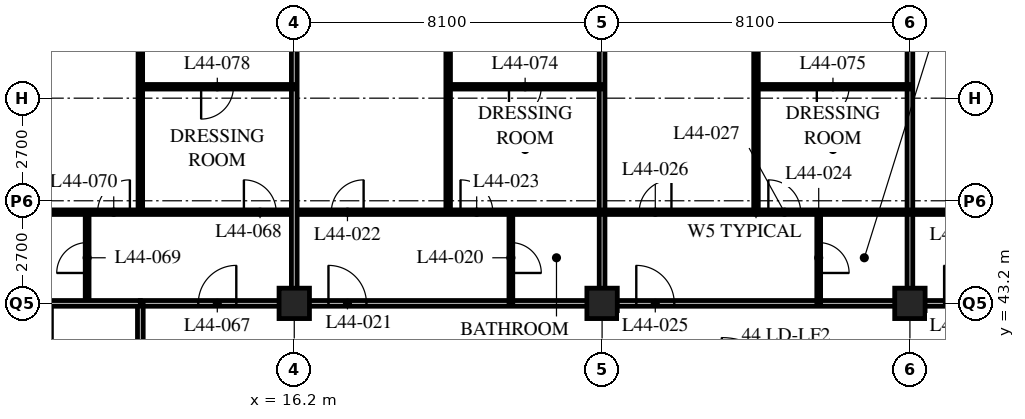
"""IFC4 building model, lengths in metres.
Left out: names, types, materials, properties, quantities, classifications, styles, units other than length and angle.
Written with IfcOpenShell. Run it as: python <this file> out.ifc"""

import sys

from ifc_helpers import new_model, si_unit, direction, frame, frame_2d, origin, origin_2d, place, context, subcontext, project, spatial, rectangle, hollow_rectangle, extrude, element, fill, save


model = new_model("IFC4")
c1 = context("Model", 3, precision=1e-05, world=origin(), true_north=direction((0.0, 1.0)))
c2 = subcontext(c1, "Body", "Model", "MODEL_VIEW")
j1 = project(units=[si_unit("LENGTHUNIT", "METRE"), si_unit("PLANEANGLEUNIT", "RADIAN")], contexts=[c1])
p1 = place(None, origin())
s1 = spatial("IfcSite", under=j1, at=p1, CompositionType="ELEMENT")
p2 = place(p1, origin())
s2 = spatial("IfcBuilding", under=s1, at=p2, CompositionType="ELEMENT")
p3 = place(p2, frame((0.0, 0.0, 174.0)))
s3 = spatial("IfcBuildingStorey", under=s2, at=p3, CompositionType="ELEMENT", Elevation=174.0)
for number, where, z_axis, x_axis in (
    (1, (16.2, 43.2, 0.0), (0.0, 0.0, 1.0), (1.0, 0.0, 0.0)),
    (2, (24.3, 43.2, 0.0), (0.0, 0.0, 1.0), (1.0, 0.0, 0.0)),
    (3, (32.4, 43.2, 0.0), (0.0, 0.0, 1.0), (1.0, 0.0, 0.0)),
):
    element("IfcColumn", number, at=place(p3, frame(where, z_axis=z_axis, x_axis=x_axis)), inside=s3, PredefinedType="COLUMN", context=c2, shape_type="SweptSolid", body=[
        extrude(hollow_rectangle(XDim=0.8, YDim=0.8, WallThickness=0.08, at=origin_2d()), origin(), (0.0, 0.0, 1.0), 3.6),
    ])
p4 = place(p3, frame((12.15, 43.2, 0.0), z_axis=(0.0, 0.0, 1.0), x_axis=(1.0, 0.0, 0.0)))
e4 = element("IfcWall", 4, at=p4, inside=s3, PredefinedType="PARTITIONING", context=c2, shape_type="SweptSolid", body=[
    extrude(rectangle(XDim=32.4, YDim=0.15, at=frame_2d((16.2, 0.0))), origin(), (0.0, 0.0, 1.0), 2.778),
])
p5 = place(p4, frame((4.95, 0.0, 0.0)))
e5 = element("IfcOpeningElement", 5, at=p5, cuts=e4, PredefinedType="OPENING", context=c2, shape_type="SweptSolid", body=[
    extrude(rectangle(XDim=1.0, YDim=2.1, at=frame_2d((0.5, 1.05))), frame((0.0, 0.085, 0.0), z_axis=(0.0, -1.0, 0.0), x_axis=(1.0, 0.0, 0.0)), (0.0, 0.0, 1.0), 0.17),
])
p6 = place(p4, frame((13.05, 0.0, 0.0)))
e6 = element("IfcOpeningElement", 6, at=p6, cuts=e4, PredefinedType="OPENING", context=c2, shape_type="SweptSolid", body=[
    extrude(rectangle(XDim=1.0, YDim=2.1, at=frame_2d((0.5, 1.05))), frame((0.0, 0.085, 0.0), z_axis=(0.0, -1.0, 0.0), x_axis=(1.0, 0.0, 0.0)), (0.0, 0.0, 1.0), 0.17),
])
p7 = place(p4, frame((21.15, 0.0, 0.0)))
e7 = element("IfcOpeningElement", 7, at=p7, cuts=e4, PredefinedType="OPENING", context=c2, shape_type="SweptSolid", body=[
    extrude(rectangle(XDim=1.0, YDim=2.1, at=frame_2d((0.5, 1.05))), frame((0.0, 0.085, 0.0), z_axis=(0.0, -1.0, 0.0), x_axis=(1.0, 0.0, 0.0)), (0.0, 0.0, 1.0), 0.17),
])
p8 = place(p4, frame((29.875, 0.0, 0.0)))
e8 = element("IfcOpeningElement", 8, at=p8, cuts=e4, PredefinedType="OPENING", context=c2, shape_type="SweptSolid", body=[
    extrude(rectangle(XDim=1.0, YDim=2.1, at=frame_2d((0.5, 1.05))), frame((0.0, 0.085, 0.0), z_axis=(0.0, -1.0, 0.0), x_axis=(1.0, 0.0, 0.0)), (0.0, 0.0, 1.0), 0.17),
])
p9 = place(p4, frame((1.525, 0.0, 0.0)))
e9 = element("IfcOpeningElement", 9, at=p9, cuts=e4, PredefinedType="OPENING", context=c2, shape_type="SweptSolid", body=[
    extrude(rectangle(XDim=1.0, YDim=2.1, at=frame_2d((0.5, 1.05))), frame((0.0, 0.085, 0.0), z_axis=(0.0, -1.0, 0.0), x_axis=(1.0, 0.0, 0.0)), (0.0, 0.0, 1.0), 0.17),
])
p10 = place(p3, frame((12.15, 18.9, 0.0), z_axis=(0.0, 0.0, 1.0), x_axis=(0.0, 1.0, 0.0)))
e10 = element("IfcWall", 10, at=p10, inside=s3, PredefinedType="PARTITIONING", context=c2, shape_type="SweptSolid", body=[
    extrude(rectangle(XDim=24.3, YDim=0.15, at=frame_2d((12.15, 0.0))), origin(), (0.0, 0.0, 1.0), 3.39),
])
p11 = place(p10, frame((2.35, 0.0, 0.0)))
e11 = element("IfcOpeningElement", 11, at=p11, cuts=e10, PredefinedType="OPENING", context=c2, shape_type="SweptSolid", body=[
    extrude(rectangle(XDim=1.0, YDim=2.1, at=frame_2d((0.5, 1.05))), frame((0.0, 0.085, 0.0), z_axis=(0.0, -1.0, 0.0), x_axis=(1.0, 0.0, 0.0)), (0.0, 0.0, 1.0), 0.17),
])
p12 = place(p10, frame((6.4, 0.0, 0.0)))
e12 = element("IfcOpeningElement", 12, at=p12, cuts=e10, PredefinedType="OPENING", context=c2, shape_type="SweptSolid", body=[
    extrude(rectangle(XDim=1.0, YDim=2.1, at=frame_2d((0.5, 1.05))), frame((0.0, 0.085, 0.0), z_axis=(0.0, -1.0, 0.0), x_axis=(1.0, 0.0, 0.0)), (0.0, 0.0, 1.0), 0.17),
])
p13 = place(p10, frame((8.5, 0.0, 0.0)))
e13 = element("IfcOpeningElement", 13, at=p13, cuts=e10, PredefinedType="OPENING", context=c2, shape_type="SweptSolid", body=[
    extrude(rectangle(XDim=1.0, YDim=2.1, at=frame_2d((0.5, 1.05))), frame((0.0, 0.085, 0.0), z_axis=(0.0, -1.0, 0.0), x_axis=(1.0, 0.0, 0.0)), (0.0, 0.0, 1.0), 0.17),
])
p14 = place(p10, frame((16.6, 0.0, 0.0)))
e14 = element("IfcOpeningElement", 14, at=p14, cuts=e10, PredefinedType="OPENING", context=c2, shape_type="SweptSolid", body=[
    extrude(rectangle(XDim=1.0, YDim=2.1, at=frame_2d((0.5, 1.05))), frame((0.0, 0.085, 0.0), z_axis=(0.0, -1.0, 0.0), x_axis=(1.0, 0.0, 0.0)), (0.0, 0.0, 1.0), 0.17),
])
p15 = place(p3, frame((21.9, 43.2, 0.0), z_axis=(0.0, 0.0, 1.0), x_axis=(0.0, 1.0, 0.0)))
e15 = element("IfcWall", 15, at=p15, inside=s3, PredefinedType="PARTITIONING", context=c2, shape_type="SweptSolid", body=[
    extrude(rectangle(XDim=2.4, YDim=0.1, at=frame_2d((1.2, 0.0))), origin(), (0.0, 0.0, 1.0), 3.39),
])
p16 = place(p15, frame((0.8, 0.0, 0.0)))
e16 = element("IfcOpeningElement", 16, at=p16, cuts=e15, PredefinedType="OPENING", context=c2, shape_type="SweptSolid", body=[
    extrude(rectangle(XDim=0.8, YDim=2.1, at=frame_2d((0.4, 1.05))), frame((0.0, 0.06, 0.0), z_axis=(0.0, -1.0, 0.0), x_axis=(1.0, 0.0, 0.0)), (0.0, 0.0, 1.0), 0.12),
])
p17 = place(p3, frame((20.25, 45.6, 0.0), z_axis=(0.0, 0.0, 1.0), x_axis=(0.0, 1.0, 0.0)))
e17 = element("IfcWall", 17, at=p17, inside=s3, PredefinedType="PARTITIONING", context=c2, shape_type="SweptSolid", body=[
    extrude(rectangle(XDim=13.5, YDim=0.12, at=frame_2d((6.75, 0.0))), origin(), (0.0, 0.0, 1.0), 3.39),
])
p18 = place(p3, frame((24.3, 43.2, 0.0), z_axis=(0.0, 0.0, 1.0), x_axis=(0.0, 1.0, 0.0)))
e18 = element("IfcWall", 18, at=p18, inside=s3, PredefinedType="PARTITIONING", context=c2, shape_type="SweptSolid", body=[
    extrude(rectangle(XDim=15.9, YDim=0.15, at=frame_2d((7.95, 0.0))), origin(), (0.0, 0.0, 1.0), 2.778),
])
p19 = place(p3, frame((30.0, 43.2, 0.0), z_axis=(0.0, 0.0, 1.0), x_axis=(0.0, 1.0, 0.0)))
e19 = element("IfcWall", 19, at=p19, inside=s3, PredefinedType="PARTITIONING", context=c2, shape_type="SweptSolid", body=[
    extrude(rectangle(XDim=2.4, YDim=0.1, at=frame_2d((1.2, 0.0))), origin(), (0.0, 0.0, 1.0), 3.39),
])
p20 = place(p19, frame((0.8, 0.0, 0.0)))
e20 = element("IfcOpeningElement", 20, at=p20, cuts=e19, PredefinedType="OPENING", context=c2, shape_type="SweptSolid", body=[
    extrude(rectangle(XDim=0.8, YDim=2.1, at=frame_2d((0.4, 1.05))), frame((0.0, 0.06, 0.0), z_axis=(0.0, -1.0, 0.0), x_axis=(1.0, 0.0, 0.0)), (0.0, 0.0, 1.0), 0.12),
])
p21 = place(p3, frame((28.35, 45.6, 0.0), z_axis=(0.0, 0.0, 1.0), x_axis=(0.0, 1.0, 0.0)))
e21 = element("IfcWall", 21, at=p21, inside=s3, PredefinedType="PARTITIONING", context=c2, shape_type="SweptSolid", body=[
    extrude(rectangle(XDim=13.5, YDim=0.12, at=frame_2d((6.75, 0.0))), origin(), (0.0, 0.0, 1.0), 3.39),
])
p22 = place(p3, frame((32.4, 43.2, 0.0), z_axis=(0.0, 0.0, 1.0), x_axis=(0.0, 1.0, 0.0)))
e22 = element("IfcWall", 22, at=p22, inside=s3, PredefinedType="PARTITIONING", context=c2, shape_type="SweptSolid", body=[
    extrude(rectangle(XDim=15.9, YDim=0.15, at=frame_2d((7.95, 0.0))), origin(), (0.0, 0.0, 1.0), 2.778),
])
p23 = place(p3, frame((10.75, 43.2, 0.0), z_axis=(0.0, 0.0, 1.0), x_axis=(0.0, 1.0, 0.0)))
e23 = element("IfcWall", 23, at=p23, inside=s3, PredefinedType="PARTITIONING", context=c2, shape_type="SweptSolid", body=[
    extrude(rectangle(XDim=2.4, YDim=0.1, at=frame_2d((1.2, 0.0))), origin(), (0.0, 0.0, 1.0), 3.39),
])
p24 = place(p23, frame((0.8, 0.0, 0.0)))
e24 = element("IfcOpeningElement", 24, at=p24, cuts=e23, PredefinedType="OPENING", context=c2, shape_type="SweptSolid", body=[
    extrude(rectangle(XDim=0.8, YDim=2.1, at=frame_2d((0.4, 1.05))), frame((0.0, 0.06, 0.0), z_axis=(0.0, -1.0, 0.0), x_axis=(1.0, 0.0, 0.0)), (0.0, 0.0, 1.0), 0.12),
])
p25 = place(p3, frame((8.15, 45.6, 0.0), z_axis=(0.0, 0.0, 1.0), x_axis=(1.0, 0.0, 0.0)))
e25 = element("IfcWall", 25, at=p25, inside=s3, PredefinedType="PARTITIONING", context=c2, shape_type="SweptSolid", body=[
    extrude(rectangle(XDim=40.4, YDim=0.12, at=frame_2d((20.2, 0.0))), origin(), (0.0, 0.0, 1.0), 3.39),
])
p26 = place(p25, frame((9.025, 0.0, 0.0)))
e26 = element("IfcOpeningElement", 26, at=p26, cuts=e25, PredefinedType="OPENING", context=c2, shape_type="SweptSolid", body=[
    extrude(rectangle(XDim=0.85, YDim=2.1, at=frame_2d((0.425, 1.05))), frame((0.0, 0.07, 0.0), z_axis=(0.0, -1.0, 0.0), x_axis=(1.0, 0.0, 0.0)), (0.0, 0.0, 1.0), 0.14),
])
p27 = place(p25, frame((12.425, 0.0, 0.0)))
e27 = element("IfcOpeningElement", 27, at=p27, cuts=e25, PredefinedType="OPENING", context=c2, shape_type="SweptSolid", body=[
    extrude(rectangle(XDim=0.85, YDim=2.1, at=frame_2d((0.425, 1.05))), frame((0.0, 0.07, 0.0), z_axis=(0.0, -1.0, 0.0), x_axis=(1.0, 0.0, 0.0)), (0.0, 0.0, 1.0), 0.14),
])
p28 = place(p25, frame((17.125, 0.0, 0.0)))
e28 = element("IfcOpeningElement", 28, at=p28, cuts=e25, PredefinedType="OPENING", context=c2, shape_type="SweptSolid", body=[
    extrude(rectangle(XDim=0.85, YDim=2.1, at=frame_2d((0.425, 1.05))), frame((0.0, 0.07, 0.0), z_axis=(0.0, -1.0, 0.0), x_axis=(1.0, 0.0, 0.0)), (0.0, 0.0, 1.0), 0.14),
])
p29 = place(p25, frame((20.525, 0.0, 0.0)))
e29 = element("IfcOpeningElement", 29, at=p29, cuts=e25, PredefinedType="OPENING", context=c2, shape_type="SweptSolid", body=[
    extrude(rectangle(XDim=0.85, YDim=2.1, at=frame_2d((0.425, 1.05))), frame((0.0, 0.07, 0.0), z_axis=(0.0, -1.0, 0.0), x_axis=(1.0, 0.0, 0.0)), (0.0, 0.0, 1.0), 0.14),
])
p30 = place(p25, frame((25.225, 0.0, 0.0)))
e30 = element("IfcOpeningElement", 30, at=p30, cuts=e25, PredefinedType="OPENING", context=c2, shape_type="SweptSolid", body=[
    extrude(rectangle(XDim=0.85, YDim=2.1, at=frame_2d((0.425, 1.05))), frame((0.0, 0.07, 0.0), z_axis=(0.0, -1.0, 0.0), x_axis=(1.0, 0.0, 0.0)), (0.0, 0.0, 1.0), 0.14),
])
p31 = place(p25, frame((28.625, 0.0, 0.0)))
e31 = element("IfcOpeningElement", 31, at=p31, cuts=e25, PredefinedType="OPENING", context=c2, shape_type="SweptSolid", body=[
    extrude(rectangle(XDim=0.85, YDim=2.1, at=frame_2d((0.425, 1.05))), frame((0.0, 0.07, 0.0), z_axis=(0.0, -1.0, 0.0), x_axis=(1.0, 0.0, 0.0)), (0.0, 0.0, 1.0), 0.14),
])
p32 = place(p25, frame((32.825, 0.0, 0.0)))
e32 = element("IfcOpeningElement", 32, at=p32, cuts=e25, PredefinedType="OPENING", context=c2, shape_type="SweptSolid", body=[
    extrude(rectangle(XDim=0.85, YDim=2.1, at=frame_2d((0.425, 1.05))), frame((0.0, 0.07, 0.0), z_axis=(0.0, -1.0, 0.0), x_axis=(1.0, 0.0, 0.0)), (0.0, 0.0, 1.0), 0.14),
])
p33 = place(p25, frame((36.675, 0.0, 0.0)))
e33 = element("IfcOpeningElement", 33, at=p33, cuts=e25, PredefinedType="OPENING", context=c2, shape_type="SweptSolid", body=[
    extrude(rectangle(XDim=0.85, YDim=2.1, at=frame_2d((0.425, 1.05))), frame((0.0, 0.07, 0.0), z_axis=(0.0, -1.0, 0.0), x_axis=(1.0, 0.0, 0.0)), (0.0, 0.0, 1.0), 0.14),
])
p34 = place(p25, frame((6.725, 0.0, 0.0)))
e34 = element("IfcOpeningElement", 34, at=p34, cuts=e25, PredefinedType="OPENING", context=c2, shape_type="SweptSolid", body=[
    extrude(rectangle(XDim=0.85, YDim=2.1, at=frame_2d((0.425, 1.05))), frame((0.0, 0.07, 0.0), z_axis=(0.0, -1.0, 0.0), x_axis=(1.0, 0.0, 0.0)), (0.0, 0.0, 1.0), 0.14),
])
p35 = place(p25, frame((2.875, 0.0, 0.0)))
e35 = element("IfcOpeningElement", 35, at=p35, cuts=e25, PredefinedType="OPENING", context=c2, shape_type="SweptSolid", body=[
    extrude(rectangle(XDim=0.85, YDim=2.1, at=frame_2d((0.425, 1.05))), frame((0.0, 0.07, 0.0), z_axis=(0.0, -1.0, 0.0), x_axis=(1.0, 0.0, 0.0)), (0.0, 0.0, 1.0), 0.14),
])
p36 = place(p3, frame((12.15, 45.6, 0.0), z_axis=(0.0, 0.0, 1.0), x_axis=(0.0, 1.0, 0.0)))
e36 = element("IfcWall", 36, at=p36, inside=s3, PredefinedType="PARTITIONING", context=c2, shape_type="SweptSolid", body=[
    extrude(rectangle(XDim=13.5, YDim=0.12, at=frame_2d((6.75, 0.0))), origin(), (0.0, 0.0, 1.0), 3.39),
])
p37 = place(p3, frame((0.3, 43.2, 0.0), z_axis=(0.0, 0.0, 1.0), x_axis=(1.0, 0.0, 0.0)))
e37 = element("IfcWall", 37, at=p37, inside=s3, PredefinedType="PARTITIONING", context=c2, shape_type="SweptSolid", body=[
    extrude(rectangle(XDim=11.85, YDim=0.15, at=frame_2d((5.925, 0.0))), origin(), (0.0, 0.0, 1.0), 2.778),
])
p38 = place(p3, frame((16.2, 43.2, 0.0), z_axis=(0.0, 0.0, 1.0), x_axis=(0.0, 1.0, 0.0)))
e38 = element("IfcWall", 38, at=p38, inside=s3, PredefinedType="PARTITIONING", context=c2, shape_type="SweptSolid", body=[
    extrude(rectangle(XDim=15.9, YDim=0.15, at=frame_2d((7.95, 0.0))), origin(), (0.0, 0.0, 1.0), 2.778),
])
p39 = place(p3, frame((20.25, 48.9, 0.0), z_axis=(0.0, 0.0, 1.0), x_axis=(1.0, 0.0, 0.0)))
e39 = element("IfcWall", 39, at=p39, inside=s3, PredefinedType="PARTITIONING", context=c2, shape_type="SweptSolid", body=[
    extrude(rectangle(XDim=4.05, YDim=0.12, at=frame_2d((2.025, 0.0))), origin(), (0.0, 0.0, 1.0), 3.39),
])
p40 = place(p39, frame((1.6, 0.0, 0.0)))
e40 = element("IfcOpeningElement", 40, at=p40, cuts=e39, PredefinedType="OPENING", context=c2, shape_type="SweptSolid", body=[
    extrude(rectangle(XDim=0.85, YDim=2.1, at=frame_2d((0.425, 1.05))), frame((0.0, 0.07, 0.0), z_axis=(0.0, -1.0, 0.0), x_axis=(1.0, 0.0, 0.0)), (0.0, 0.0, 1.0), 0.14),
])
p41 = place(p3, frame((28.35, 48.9, 0.0), z_axis=(0.0, 0.0, 1.0), x_axis=(1.0, 0.0, 0.0)))
e41 = element("IfcWall", 41, at=p41, inside=s3, PredefinedType="PARTITIONING", context=c2, shape_type="SweptSolid", body=[
    extrude(rectangle(XDim=4.05, YDim=0.12, at=frame_2d((2.025, 0.0))), origin(), (0.0, 0.0, 1.0), 3.39),
])
p42 = place(p41, frame((1.6, 0.0, 0.0)))
e42 = element("IfcOpeningElement", 42, at=p42, cuts=e41, PredefinedType="OPENING", context=c2, shape_type="SweptSolid", body=[
    extrude(rectangle(XDim=0.85, YDim=2.1, at=frame_2d((0.425, 1.05))), frame((0.0, 0.07, 0.0), z_axis=(0.0, -1.0, 0.0), x_axis=(1.0, 0.0, 0.0)), (0.0, 0.0, 1.0), 0.14),
])
p43 = place(p3, frame((12.15, 48.9, 0.0), z_axis=(0.0, 0.0, 1.0), x_axis=(1.0, 0.0, 0.0)))
e43 = element("IfcWall", 43, at=p43, inside=s3, PredefinedType="PARTITIONING", context=c2, shape_type="SweptSolid", body=[
    extrude(rectangle(XDim=4.05, YDim=0.12, at=frame_2d((2.025, 0.0))), origin(), (0.0, 0.0, 1.0), 3.39),
])
p44 = place(p43, frame((1.6, 0.0, 0.0)))
e44 = element("IfcOpeningElement", 44, at=p44, cuts=e43, PredefinedType="OPENING", context=c2, shape_type="SweptSolid", body=[
    extrude(rectangle(XDim=0.85, YDim=2.1, at=frame_2d((0.425, 1.05))), frame((0.0, 0.07, 0.0), z_axis=(0.0, -1.0, 0.0), x_axis=(1.0, 0.0, 0.0)), (0.0, 0.0, 1.0), 0.14),
])
p45 = place(p16, origin())
e45 = element("IfcDoor", 45, at=p45, inside=s3, OperationType="SINGLE_SWING_RIGHT", PredefinedType="DOOR", context=c2, shape_type="SweptSolid", body=[
    extrude(rectangle(XDim=0.8, YDim=2.1, at=frame_2d((0.4, 1.05))), frame((0.0, 0.025, 0.0), z_axis=(0.0, -1.0, 0.0), x_axis=(1.0, 0.0, 0.0)), (0.0, 0.0, 1.0), 0.05),
])
fill(e16, e45)
p46 = place(p5, origin())
e46 = element("IfcDoor", 46, at=p46, inside=s3, OperationType="SINGLE_SWING_LEFT", PredefinedType="DOOR", context=c2, shape_type="SweptSolid", body=[
    extrude(rectangle(XDim=1.0, YDim=2.1, at=frame_2d((0.5, 1.05))), frame((0.0, 0.025, 0.0), z_axis=(0.0, -1.0, 0.0), x_axis=(1.0, 0.0, 0.0)), (0.0, 0.0, 1.0), 0.05),
])
fill(e5, e46)
p47 = place(p26, origin())
e47 = element("IfcDoor", 47, at=p47, inside=s3, OperationType="SINGLE_SWING_RIGHT", PredefinedType="DOOR", context=c2, shape_type="SweptSolid", body=[
    extrude(rectangle(XDim=0.85, YDim=2.1, at=frame_2d((0.425, 1.05))), frame((0.0, 0.025, 0.0), z_axis=(0.0, -1.0, 0.0), x_axis=(1.0, 0.0, 0.0)), (0.0, 0.0, 1.0), 0.05),
])
fill(e26, e47)
p48 = place(p27, origin())
e48 = element("IfcDoor", 48, at=p48, inside=s3, OperationType="SINGLE_SWING_LEFT", PredefinedType="DOOR", context=c2, shape_type="SweptSolid", body=[
    extrude(rectangle(XDim=0.85, YDim=2.1, at=frame_2d((0.425, 1.05))), frame((0.0, 0.025, 0.0), z_axis=(0.0, -1.0, 0.0), x_axis=(1.0, 0.0, 0.0)), (0.0, 0.0, 1.0), 0.05),
])
fill(e27, e48)
p49 = place(p20, origin())
e49 = element("IfcDoor", 49, at=p49, inside=s3, OperationType="SINGLE_SWING_RIGHT", PredefinedType="DOOR", context=c2, shape_type="SweptSolid", body=[
    extrude(rectangle(XDim=0.8, YDim=2.1, at=frame_2d((0.4, 1.05))), frame((0.0, 0.025, 0.0), z_axis=(0.0, -1.0, 0.0), x_axis=(1.0, 0.0, 0.0)), (0.0, 0.0, 1.0), 0.05),
])
fill(e20, e49)
p50 = place(p6, origin())
e50 = element("IfcDoor", 50, at=p50, inside=s3, OperationType="SINGLE_SWING_LEFT", PredefinedType="DOOR", context=c2, shape_type="SweptSolid", body=[
    extrude(rectangle(XDim=1.0, YDim=2.1, at=frame_2d((0.5, 1.05))), frame((0.0, 0.025, 0.0), z_axis=(0.0, -1.0, 0.0), x_axis=(1.0, 0.0, 0.0)), (0.0, 0.0, 1.0), 0.05),
])
fill(e6, e50)
p51 = place(p28, origin())
e51 = element("IfcDoor", 51, at=p51, inside=s3, OperationType="SINGLE_SWING_RIGHT", PredefinedType="DOOR", context=c2, shape_type="SweptSolid", body=[
    extrude(rectangle(XDim=0.85, YDim=2.1, at=frame_2d((0.425, 1.05))), frame((0.0, 0.025, 0.0), z_axis=(0.0, -1.0, 0.0), x_axis=(1.0, 0.0, 0.0)), (0.0, 0.0, 1.0), 0.05),
])
fill(e28, e51)
p52 = place(p29, origin())
e52 = element("IfcDoor", 52, at=p52, inside=s3, OperationType="SINGLE_SWING_LEFT", PredefinedType="DOOR", context=c2, shape_type="SweptSolid", body=[
    extrude(rectangle(XDim=0.85, YDim=2.1, at=frame_2d((0.425, 1.05))), frame((0.0, 0.025, 0.0), z_axis=(0.0, -1.0, 0.0), x_axis=(1.0, 0.0, 0.0)), (0.0, 0.0, 1.0), 0.05),
])
fill(e29, e52)
p53 = place(p7, origin())
e53 = element("IfcDoor", 53, at=p53, inside=s3, OperationType="SINGLE_SWING_LEFT", PredefinedType="DOOR", context=c2, shape_type="SweptSolid", body=[
    extrude(rectangle(XDim=1.0, YDim=2.1, at=frame_2d((0.5, 1.05))), frame((0.0, 0.025, 0.0), z_axis=(0.0, -1.0, 0.0), x_axis=(1.0, 0.0, 0.0)), (0.0, 0.0, 1.0), 0.05),
])
fill(e7, e53)
p54 = place(p9, origin())
e54 = element("IfcDoor", 54, at=p54, inside=s3, OperationType="SINGLE_SWING_RIGHT", PredefinedType="DOOR", context=c2, shape_type="SweptSolid", body=[
    extrude(rectangle(XDim=1.0, YDim=2.1, at=frame_2d((0.5, 1.05))), frame((0.0, 0.025, 0.0), z_axis=(0.0, -1.0, 0.0), x_axis=(1.0, 0.0, 0.0)), (0.0, 0.0, 1.0), 0.05),
])
fill(e9, e54)
p55 = place(p34, origin())
e55 = element("IfcDoor", 55, at=p55, inside=s3, OperationType="SINGLE_SWING_LEFT", PredefinedType="DOOR", context=c2, shape_type="SweptSolid", body=[
    extrude(rectangle(XDim=0.85, YDim=2.1, at=frame_2d((0.425, 1.05))), frame((0.0, 0.025, 0.0), z_axis=(0.0, -1.0, 0.0), x_axis=(1.0, 0.0, 0.0)), (0.0, 0.0, 1.0), 0.05),
])
fill(e34, e55)
p56 = place(p24, origin())
e56 = element("IfcDoor", 56, at=p56, inside=s3, OperationType="SINGLE_SWING_LEFT", PredefinedType="DOOR", context=c2, shape_type="SweptSolid", body=[
    extrude(rectangle(XDim=0.8, YDim=2.1, at=frame_2d((0.4, 1.05))), frame((0.0, 0.025, 0.0), z_axis=(0.0, -1.0, 0.0), x_axis=(1.0, 0.0, 0.0)), (0.0, 0.0, 1.0), 0.05),
])
fill(e24, e56)
p57 = place(p35, origin())
e57 = element("IfcDoor", 57, at=p57, inside=s3, OperationType="SINGLE_SWING_RIGHT", PredefinedType="DOOR", context=c2, shape_type="SweptSolid", body=[
    extrude(rectangle(XDim=0.85, YDim=2.1, at=frame_2d((0.425, 1.05))), frame((0.0, 0.025, 0.0), z_axis=(0.0, -1.0, 0.0), x_axis=(1.0, 0.0, 0.0)), (0.0, 0.0, 1.0), 0.05),
])
fill(e35, e57)
p58 = place(p40, origin())
e58 = element("IfcDoor", 58, at=p58, inside=s3, OperationType="SINGLE_SWING_RIGHT", PredefinedType="DOOR", context=c2, shape_type="SweptSolid", body=[
    extrude(rectangle(XDim=0.85, YDim=2.1, at=frame_2d((0.425, 1.05))), frame((0.0, 0.025, 0.0), z_axis=(0.0, -1.0, 0.0), x_axis=(1.0, 0.0, 0.0)), (0.0, 0.0, 1.0), 0.05),
])
fill(e40, e58)
p59 = place(p42, origin())
e59 = element("IfcDoor", 59, at=p59, inside=s3, OperationType="SINGLE_SWING_RIGHT", PredefinedType="DOOR", context=c2, shape_type="SweptSolid", body=[
    extrude(rectangle(XDim=0.85, YDim=2.1, at=frame_2d((0.425, 1.05))), frame((0.0, 0.025, 0.0), z_axis=(0.0, -1.0, 0.0), x_axis=(1.0, 0.0, 0.0)), (0.0, 0.0, 1.0), 0.05),
])
fill(e42, e59)
p60 = place(p44, origin())
e60 = element("IfcDoor", 60, at=p60, inside=s3, OperationType="SINGLE_SWING_RIGHT", PredefinedType="DOOR", context=c2, shape_type="SweptSolid", body=[
    extrude(rectangle(XDim=0.85, YDim=2.1, at=frame_2d((0.425, 1.05))), frame((0.0, 0.025, 0.0), z_axis=(0.0, -1.0, 0.0), x_axis=(1.0, 0.0, 0.0)), (0.0, 0.0, 1.0), 0.05),
])
fill(e44, e60)
save(model, sys.argv[1])
